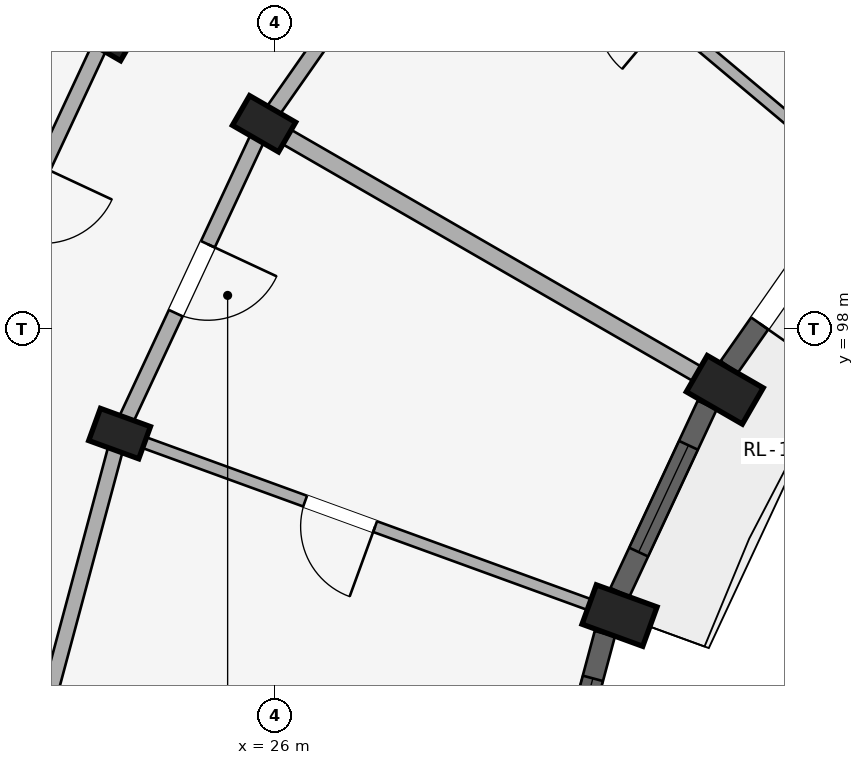
"""IFC4 building model, lengths in metres.
Left out: names, types, materials, properties, quantities, classifications, styles, units other than length and angle.
Written with IfcOpenShell. Run it as: python <this file> out.ifc"""

import sys

from ifc_helpers import new_model, si_unit, direction, frame, frame_2d, origin, origin_2d, place, context, subcontext, project, spatial, rectangle, extrude, element, fill, save


model = new_model("IFC4")
c1 = context("Model", 3, precision=1e-05, world=origin(), true_north=direction((0.0, 1.0)))
c2 = subcontext(c1, "Body", "Model", "MODEL_VIEW")
j1 = project(units=[si_unit("LENGTHUNIT", "METRE"), si_unit("PLANEANGLEUNIT", "RADIAN")], contexts=[c1])
p1 = place(None, origin())
s1 = spatial("IfcSite", under=j1, at=p1, CompositionType="ELEMENT")
p2 = place(p1, origin())
s2 = spatial("IfcBuilding", under=s1, at=p2, CompositionType="ELEMENT")
p3 = place(p2, frame((0.0, 0.0, 11.85)))
s3 = spatial("IfcBuildingStorey", under=s2, at=p3, CompositionType="ELEMENT", Elevation=11.85)
p4 = place(p3, frame((31.919, 97.2, 0.0), z_axis=(0.0, 0.0, 1.0), x_axis=(0.5, 0.866025403784, 0.0)))
e1 = element("IfcColumn", 1, at=p4, inside=s3, PredefinedType="COLUMN", context=c2, shape_type="SweptSolid", body=[
    extrude(rectangle(XDim=0.55, YDim=0.85, at=origin_2d()), origin(), (0.0, 0.0, 1.0), 2.93),
])
for number, where, z_axis, x_axis in (
    (2, (25.856, 100.7, 0.0), (0.0, 0.0, 1.0), (0.5, 0.866, 0.0)),
    (3, (23.778, 101.9, 0.0), (0.0, 0.0, 1.0), (0.5, 0.866, 0.0)),
):
    element("IfcColumn", number, at=place(p3, frame(where, z_axis=z_axis, x_axis=x_axis)), inside=s3, PredefinedType="COLUMN", context=c2, shape_type="SweptSolid", body=[
        extrude(rectangle(XDim=0.45, YDim=0.7, at=origin_2d()), origin(), (0.0, 0.0, 1.0), 2.93),
    ])
p5 = place(p3, frame((30.534, 94.23, 0.0), z_axis=(0.0, 0.0, 1.0), x_axis=(0.342020143326, 0.939692620786, 0.0)))
e4 = element("IfcColumn", 4, at=p5, inside=s3, PredefinedType="COLUMN", context=c2, shape_type="SweptSolid", body=[
    extrude(rectangle(XDim=0.55, YDim=0.85, at=origin_2d()), origin(), (0.0, 0.0, 1.0), 2.93),
])
p6 = place(p3, frame((23.956, 96.624, 0.0), z_axis=(0.0, 0.0, 1.0), x_axis=(0.342020143326, 0.939692620786, 0.0)))
e5 = element("IfcColumn", 5, at=p6, inside=s3, PredefinedType="COLUMN", context=c2, shape_type="SweptSolid", body=[
    extrude(rectangle(XDim=0.45, YDim=0.7, at=origin_2d()), origin(), (0.0, 0.0, 1.0), 2.93),
])
p7 = place(p3, frame((28.436, 104.384, 0.0), z_axis=(0.0, 0.0, 1.0), x_axis=(-0.573571637217, -0.819155404658, 0.0)))
e6 = element("IfcWall", 6, at=p7, inside=s3, PredefinedType="STANDARD", context=c2, shape_type="SweptSolid", body=[
    extrude(rectangle(XDim=4.497, YDim=0.2, at=frame_2d((2.249, 0.0))), origin(), (0.0, 0.0, 1.0), 2.372),
])
p8 = place(p3, frame((25.856, 100.7, 0.0), z_axis=(0.0, 0.0, 1.0), x_axis=(-0.422617978463, -0.906307919131, 0.0)))
e7 = element("IfcWall", 7, at=p8, inside=s3, PredefinedType="STANDARD", context=c2, shape_type="SweptSolid", body=[
    extrude(rectangle(XDim=4.497, YDim=0.2, at=frame_2d((2.249, 0.0))), origin(), (0.0, 0.0, 1.0), 2.372),
])
p9 = place(p8, frame((1.749, 0.0, 0.0)))
e8 = element("IfcOpeningElement", 8, at=p9, cuts=e7, PredefinedType="OPENING", context=c2, shape_type="SweptSolid", body=[
    extrude(rectangle(XDim=1.0, YDim=2.15, at=frame_2d((0.5, 1.075))), frame((0.0, 0.11, 0.0), z_axis=(0.0, -1.0, 0.0), x_axis=(1.0, 0.0, 0.0)), (0.0, 0.0, 1.0), 0.22),
])
p10 = place(p3, frame((23.778, 101.9, 0.0), z_axis=(0.0, 0.0, 1.0), x_axis=(-0.422629854778, -0.906302381024, 0.0)))
e9 = element("IfcWall", 9, at=p10, inside=s3, PredefinedType="STANDARD", context=c2, shape_type="SweptSolid", body=[
    extrude(rectangle(XDim=4.915, YDim=0.2, at=frame_2d((2.458, 0.0))), origin(), (0.0, 0.0, 1.0), 2.372),
])
p11 = place(p10, frame((1.958, 0.0, 0.0)))
e10 = element("IfcOpeningElement", 10, at=p11, cuts=e9, PredefinedType="OPENING", context=c2, shape_type="SweptSolid", body=[
    extrude(rectangle(XDim=1.0, YDim=2.15, at=frame_2d((0.5, 1.075))), frame((0.0, 0.11, 0.0), z_axis=(0.0, -1.0, 0.0), x_axis=(1.0, 0.0, 0.0)), (0.0, 0.0, 1.0), 0.22),
])
p12 = place(p3, frame((23.956, 96.624, 0.0), z_axis=(0.0, 0.0, 1.0), x_axis=(-0.258787642463, -0.965934240054, 0.0)))
e11 = element("IfcWall", 11, at=p12, inside=s3, PredefinedType="STANDARD", context=c2, shape_type="SweptSolid", body=[
    extrude(rectangle(XDim=4.497, YDim=0.2, at=frame_2d((2.249, 0.0))), origin(), (0.0, 0.0, 1.0), 2.372),
])
p13 = place(p3, frame((33.645, 100.013, 0.0), z_axis=(0.0, 0.0, 1.0), x_axis=(-0.766046761698, 0.642784846501, 0.0)))
e12 = element("IfcWall", 12, at=p13, inside=s3, PredefinedType="PARTITIONING", context=c2, shape_type="SweptSolid", body=[
    extrude(rectangle(XDim=6.75, YDim=0.15, at=frame_2d((3.375, 0.0))), origin(), (0.0, 0.0, 1.0), 2.372),
])
p14 = place(p13, frame((3.262, 0.0, 0.0)))
e13 = element("IfcOpeningElement", 13, at=p14, cuts=e12, PredefinedType="OPENING", context=c2, shape_type="SweptSolid", body=[
    extrude(rectangle(XDim=0.9, YDim=2.1, at=frame_2d((0.45, 1.05))), frame((0.0, 0.085, 0.0), z_axis=(0.0, -1.0, 0.0), x_axis=(1.0, 0.0, 0.0)), (0.0, 0.0, 1.0), 0.17),
])
p15 = place(p3, frame((31.746, 97.3, 0.0), z_axis=(0.0, 0.0, 1.0), x_axis=(-0.866026575979, 0.499997969693, 0.0)))
e14 = element("IfcWall", 14, at=p15, inside=s3, PredefinedType="STANDARD", context=c2, shape_type="SweptSolid", body=[
    extrude(rectangle(XDim=6.75, YDim=0.22, at=frame_2d((3.375, 0.0))), origin(), (0.0, 0.0, 1.0), 2.372),
])
p16 = place(p3, frame((30.346, 94.298, 0.0), z_axis=(0.0, 0.0, 1.0), x_axis=(-0.939696231917, 0.342010221662, 0.0)))
e15 = element("IfcWall", 15, at=p16, inside=s3, PredefinedType="PARTITIONING", context=c2, shape_type="SweptSolid", body=[
    extrude(rectangle(XDim=6.75, YDim=0.15, at=frame_2d((3.375, 0.0))), origin(), (0.0, 0.0, 1.0), 2.372),
])
p17 = place(p16, frame((3.222, 0.0, 0.0)))
e16 = element("IfcOpeningElement", 16, at=p17, cuts=e15, PredefinedType="OPENING", context=c2, shape_type="SweptSolid", body=[
    extrude(rectangle(XDim=0.98, YDim=2.12, at=frame_2d((0.49, 1.06))), frame((0.0, 0.085, 0.0), z_axis=(0.0, -1.0, 0.0), x_axis=(1.0, 0.0, 0.0)), (0.0, 0.0, 1.0), 0.17),
])
p18 = place(p3, frame((33.535, 99.727, 0.0), z_axis=(0.0, 0.0, 1.0), x_axis=(-0.573546755948, -0.81917282593, 0.0)))
e17 = element("IfcWall", 17, at=p18, inside=s3, PredefinedType="STANDARD", context=c2, shape_type="SweptSolid", body=[
    extrude(rectangle(XDim=2.718, YDim=0.275, at=frame_2d((1.359, 0.0))), origin(), (0.0, 0.0, 1.0), 2.422),
])
p19 = place(p18, frame((0.699, 0.0, 0.0)))
e18 = element("IfcOpeningElement", 18, at=p19, cuts=e17, PredefinedType="OPENING", context=c2, shape_type="SweptSolid", body=[
    extrude(rectangle(XDim=1.32, YDim=2.15, at=frame_2d((0.66, 1.075))), frame((0.0, 0.147, 0.0), z_axis=(0.0, -1.0, 0.0), x_axis=(1.0, 0.0, 0.0)), (0.0, 0.0, 1.0), 0.295),
])
p20 = place(p3, frame((31.687, 96.999, 0.0), z_axis=(0.0, 0.0, 1.0), x_axis=(-0.422610022166, -0.906311629168, 0.0)))
e19 = element("IfcWall", 19, at=p20, inside=s3, PredefinedType="STANDARD", context=c2, shape_type="SweptSolid", body=[
    extrude(rectangle(XDim=2.718, YDim=0.275, at=frame_2d((1.359, 0.0))), origin(), (0.0, 0.0, 1.0), 2.422),
])
p21 = place(p20, frame((0.584, 0.0, 0.622)))
e20 = element("IfcOpeningElement", 20, at=p21, cuts=e19, PredefinedType="OPENING", context=c2, shape_type="SweptSolid", body=[
    extrude(rectangle(XDim=1.55, YDim=1.6, at=frame_2d((0.775, 0.8))), frame((0.0, 0.147, 0.0), z_axis=(0.0, -1.0, 0.0), x_axis=(1.0, 0.0, 0.0)), (0.0, 0.0, 1.0), 0.295),
])
p22 = place(p3, frame((30.341, 93.992, 0.0), z_axis=(0.0, 0.0, 1.0), x_axis=(-0.258819907011, -0.965925595341, 0.0)))
e21 = element("IfcWall", 21, at=p22, inside=s3, PredefinedType="STANDARD", context=c2, shape_type="SweptSolid", body=[
    extrude(rectangle(XDim=2.718, YDim=0.275, at=frame_2d((1.359, 0.0))), origin(), (0.0, 0.0, 1.0), 2.422),
])
p23 = place(p22, frame((0.609, 0.0, 0.572)))
e22 = element("IfcOpeningElement", 22, at=p23, cuts=e21, PredefinedType="OPENING", context=c2, shape_type="SweptSolid", body=[
    extrude(rectangle(XDim=1.5, YDim=1.65, at=frame_2d((0.75, 0.825))), frame((0.0, 0.147, 0.0), z_axis=(0.0, -1.0, 0.0), x_axis=(1.0, 0.0, 0.0)), (0.0, 0.0, 1.0), 0.295),
])
p24 = place(p21, origin())
e23 = element("IfcWindow", 23, at=p24, inside=s3, PartitioningType="DOUBLE_PANEL_VERTICAL", PredefinedType="WINDOW", context=c2, shape_type="SweptSolid", body=[
    extrude(rectangle(XDim=1.55, YDim=1.6, at=frame_2d((0.775, 0.8))), frame((0.0, 0.03, 0.0), z_axis=(0.0, -1.0, 0.0), x_axis=(1.0, 0.0, 0.0)), (0.0, 0.0, 1.0), 0.06),
])
fill(e20, e23)
p25 = place(p23, origin())
e24 = element("IfcWindow", 24, at=p25, inside=s3, PartitioningType="DOUBLE_PANEL_VERTICAL", PredefinedType="WINDOW", context=c2, shape_type="SweptSolid", body=[
    extrude(rectangle(XDim=1.5, YDim=1.65, at=frame_2d((0.75, 0.825))), frame((0.0, 0.03, 0.0), z_axis=(0.0, -1.0, 0.0), x_axis=(1.0, 0.0, 0.0)), (0.0, 0.0, 1.0), 0.06),
])
fill(e22, e24)
p26 = place(p17, origin())
e25 = element("IfcDoor", 25, at=p26, inside=s3, OperationType="SINGLE_SWING_LEFT", PredefinedType="DOOR", context=c2, shape_type="SweptSolid", body=[
    extrude(rectangle(XDim=0.98, YDim=2.12, at=frame_2d((0.49, 1.06))), frame((0.0, 0.025, 0.0), z_axis=(0.0, -1.0, 0.0), x_axis=(1.0, 0.0, 0.0)), (0.0, 0.0, 1.0), 0.05),
])
fill(e16, e25)
p27 = place(p9, frame((1.0, 0.0, 0.0), z_axis=(0.0, 0.0, 1.0), x_axis=(-1.0, 0.0, 0.0)))
e26 = element("IfcDoor", 26, at=p27, inside=s3, OperationType="SINGLE_SWING_RIGHT", PredefinedType="DOOR", context=c2, shape_type="SweptSolid", body=[
    extrude(rectangle(XDim=1.0, YDim=2.15, at=frame_2d((0.5, 1.075))), frame((0.0, 0.025, 0.0), z_axis=(0.0, -1.0, 0.0), x_axis=(1.0, 0.0, 0.0)), (0.0, 0.0, 1.0), 0.05),
])
fill(e8, e26)
p28 = place(p19, origin())
e27 = element("IfcDoor", 27, at=p28, inside=s3, OperationType="SINGLE_SWING_RIGHT", PredefinedType="DOOR", context=c2, shape_type="SweptSolid", body=[
    extrude(rectangle(XDim=1.32, YDim=2.15, at=frame_2d((0.66, 1.075))), frame((0.0, 0.025, 0.0), z_axis=(0.0, -1.0, 0.0), x_axis=(1.0, 0.0, 0.0)), (0.0, 0.0, 1.0), 0.05),
])
fill(e18, e27)
save(model, sys.argv[1])
